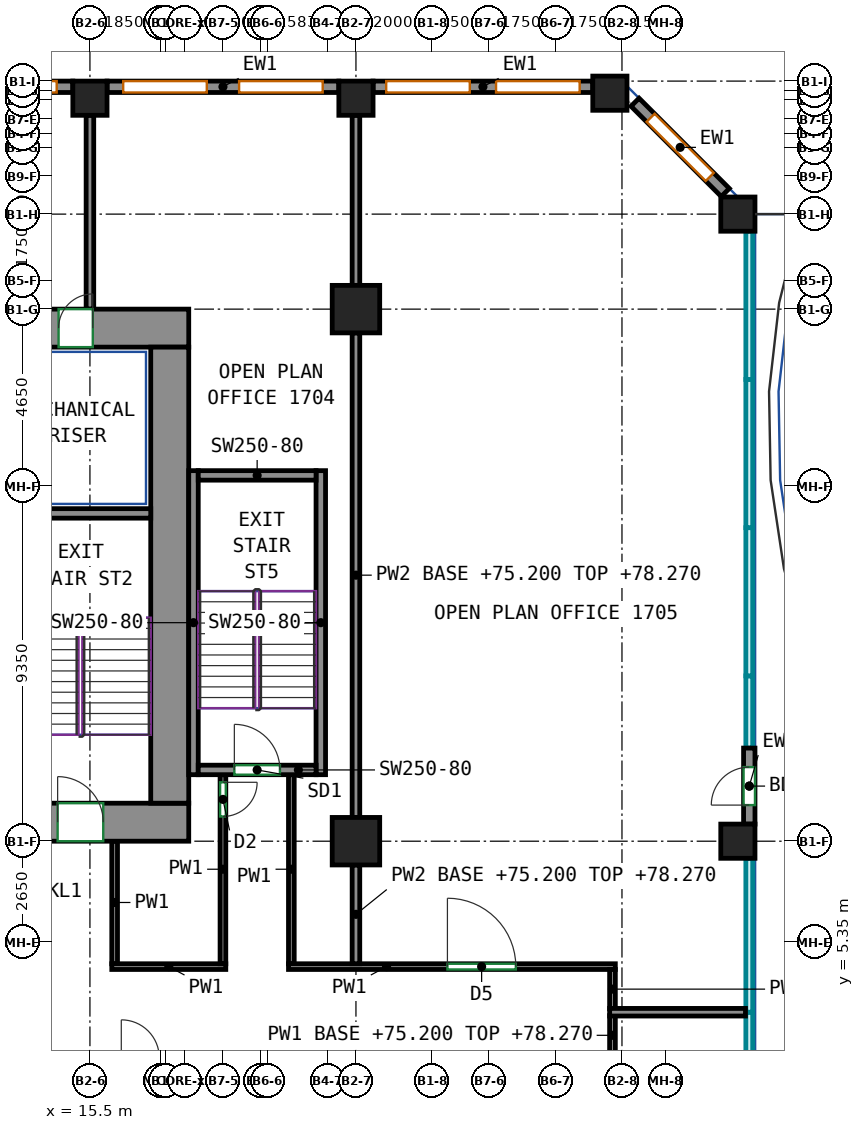
"""IFC4 building model, lengths in metres.
Left out: names, types, materials, properties, quantities, classifications, styles, units other than length and angle.
Written with IfcOpenShell. Run it as: python <this file> out.ifc"""

import sys

from ifc_helpers import new_model, si_unit, direction, frame, frame_2d, origin, origin_2d, place, context, subcontext, project, spatial, rectangle, extrude, source, transform, mapped, element, fill, save


model = new_model("IFC4")
c1 = context("Model", 3, precision=1e-05, world=origin(), true_north=direction((0.0, 1.0)))
c2 = subcontext(c1, "Body", "Model", "MODEL_VIEW")
j1 = project(units=[si_unit("LENGTHUNIT", "METRE"), si_unit("PLANEANGLEUNIT", "RADIAN")], contexts=[c1])
p1 = place(None, origin())
s1 = spatial("IfcSite", under=j1, at=p1, CompositionType="ELEMENT")
p2 = place(p1, origin())
s2 = spatial("IfcBuilding", under=s1, at=p2, CompositionType="ELEMENT")
p3 = place(p2, frame((0.0, 0.0, 75.2)))
s3 = spatial("IfcBuildingStorey", under=s2, at=p3, CompositionType="ELEMENT", Elevation=75.2)
m1 = source(origin(), c2, "Body", "SweptSolid", [
    extrude(rectangle(XDim=0.9, YDim=0.9, at=origin_2d()), origin(), (0.0, 0.0, 1.0), 3.72),
])
p4 = place(p3, frame((15.5, 27.55, 0.0), z_axis=(0.0, 0.0, 1.0), x_axis=(1.0, 0.0, 0.0)))
e1 = element("IfcColumn", 1, at=p4, inside=s3, PredefinedType="COLUMN", context=c2, shape_type="MappedRepresentation", body=[
    mapped(m1, transform((0.0, 0.0, 0.0))),
])
m2 = source(origin(), c2, "Body", "SweptSolid", [
    extrude(rectangle(XDim=1.25, YDim=1.25, at=origin_2d()), origin(), (0.0, 0.0, 1.0), 3.72),
])
for number, where, z_axis, x_axis in (
    (2, (22.5, 8.0, 0.0), (0.0, 0.0, 1.0), (1.0, 0.0, 0.0)),
    (3, (22.5, 22.0, 0.0), (0.0, 0.0, 1.0), (1.0, 0.0, 0.0)),
):
    element("IfcColumn", number, at=place(p3, frame(where, z_axis=z_axis, x_axis=x_axis)), inside=s3, PredefinedType="COLUMN", context=c2, shape_type="MappedRepresentation", body=[
        mapped(m2, transform((0.0, 0.0, 0.0))),
    ])
for number, where, z_axis, x_axis in (
    (4, (22.5, 27.55, 0.0), (0.0, 0.0, 1.0), (1.0, 0.0, 0.0)),
    (5, (29.182, 27.682, 0.0), (0.0, 0.0, 1.0), (1.0, 0.0, 0.0)),
    (6, (32.55, 8.0, 0.0), (0.0, 0.0, 1.0), (1.0, 0.0, 0.0)),
    (7, (32.55, 24.5, 0.0), (0.0, 0.0, 1.0), (1.0, 0.0, 0.0)),
):
    element("IfcColumn", number, at=place(p3, frame(where, z_axis=z_axis, x_axis=x_axis)), inside=s3, PredefinedType="COLUMN", context=c2, shape_type="MappedRepresentation", body=[
        mapped(m1, transform((0.0, 0.0, 0.0))),
    ])
m3 = source(origin(), c2, "Body", "SweptSolid", [
    extrude(rectangle(XDim=5.63, YDim=1.0, at=frame_2d((2.815, 0.0))), origin(), (0.0, 0.0, 1.0), 3.72),
])
p5 = place(p3, frame((12.47, 8.5, 0.0), z_axis=(0.0, 0.0, 1.0), x_axis=(1.0, 0.0, 0.0)))
e8 = element("IfcWall", 8, at=p5, inside=s3, PredefinedType="SHEAR", context=c2, shape_type="MappedRepresentation", body=[
    mapped(m3, transform((0.0, 0.0, 0.0))),
])
p6 = place(p5, frame((2.18, 0.0, 0.0)))
e9 = element("IfcOpeningElement", 9, at=p6, cuts=e8, PredefinedType="OPENING", context=c2, shape_type="SweptSolid", body=[
    extrude(rectangle(XDim=1.2, YDim=2.1, at=frame_2d((0.6, 1.05))), frame((0.0, 0.51, 0.0), z_axis=(0.0, -1.0, 0.0), x_axis=(1.0, 0.0, 0.0)), (0.0, 0.0, 1.0), 1.02),
])
m4 = source(origin(), c2, "Body", "SweptSolid", [
    extrude(rectangle(XDim=34.1, YDim=1.0, at=frame_2d((17.05, 0.0))), origin(), (0.0, 0.0, 1.0), 3.72),
])
p7 = place(p3, frame((-16.0, 21.5, 0.0), z_axis=(0.0, 0.0, 1.0), x_axis=(1.0, 0.0, 0.0)))
e10 = element("IfcWall", 10, at=p7, inside=s3, PredefinedType="SHEAR", context=c2, shape_type="MappedRepresentation", body=[
    mapped(m4, transform((0.0, 0.0, 0.0))),
])
p8 = place(p7, frame((6.108, 0.0, 0.0)))
e11 = element("IfcOpeningElement", 11, at=p8, cuts=e10, PredefinedType="OPENING", context=c2, shape_type="SweptSolid", body=[
    extrude(rectangle(XDim=0.9, YDim=2.1, at=frame_2d((0.45, 1.05))), frame((0.0, 0.51, 0.0), z_axis=(0.0, -1.0, 0.0), x_axis=(1.0, 0.0, 0.0)), (0.0, 0.0, 1.0), 1.02),
])
p9 = place(p7, frame((11.173, 0.0, 0.0)))
e12 = element("IfcOpeningElement", 12, at=p9, cuts=e10, PredefinedType="OPENING", context=c2, shape_type="SweptSolid", body=[
    extrude(rectangle(XDim=0.9, YDim=2.1, at=frame_2d((0.45, 1.05))), frame((0.0, 0.51, 0.0), z_axis=(0.0, -1.0, 0.0), x_axis=(1.0, 0.0, 0.0)), (0.0, 0.0, 1.0), 1.02),
])
p10 = place(p7, frame((16.238, 0.0, 0.0)))
e13 = element("IfcOpeningElement", 13, at=p10, cuts=e10, PredefinedType="OPENING", context=c2, shape_type="SweptSolid", body=[
    extrude(rectangle(XDim=0.9, YDim=2.1, at=frame_2d((0.45, 1.05))), frame((0.0, 0.51, 0.0), z_axis=(0.0, -1.0, 0.0), x_axis=(1.0, 0.0, 0.0)), (0.0, 0.0, 1.0), 1.02),
])
p11 = place(p7, frame((21.062, 0.0, 0.0)))
e14 = element("IfcOpeningElement", 14, at=p11, cuts=e10, PredefinedType="OPENING", context=c2, shape_type="SweptSolid", body=[
    extrude(rectangle(XDim=0.9, YDim=2.1, at=frame_2d((0.45, 1.05))), frame((0.0, 0.51, 0.0), z_axis=(0.0, -1.0, 0.0), x_axis=(1.0, 0.0, 0.0)), (0.0, 0.0, 1.0), 1.02),
])
p12 = place(p7, frame((26.489, 0.0, 0.0)))
e15 = element("IfcOpeningElement", 15, at=p12, cuts=e10, PredefinedType="OPENING", context=c2, shape_type="SweptSolid", body=[
    extrude(rectangle(XDim=0.9, YDim=2.1, at=frame_2d((0.45, 1.05))), frame((0.0, 0.51, 0.0), z_axis=(0.0, -1.0, 0.0), x_axis=(1.0, 0.0, 0.0)), (0.0, 0.0, 1.0), 1.02),
])
p13 = place(p7, frame((2.525, 0.0, 0.0)))
e16 = element("IfcOpeningElement", 16, at=p13, cuts=e10, PredefinedType="OPENING", context=c2, shape_type="SweptSolid", body=[
    extrude(rectangle(XDim=0.9, YDim=2.1, at=frame_2d((0.45, 1.05))), frame((0.0, 0.51, 0.0), z_axis=(0.0, -1.0, 0.0), x_axis=(1.0, 0.0, 0.0)), (0.0, 0.0, 1.0), 1.02),
])
p14 = place(p7, frame((30.675, 0.0, 0.0)))
e17 = element("IfcOpeningElement", 17, at=p14, cuts=e10, PredefinedType="OPENING", context=c2, shape_type="SweptSolid", body=[
    extrude(rectangle(XDim=0.9, YDim=2.1, at=frame_2d((0.45, 1.05))), frame((0.0, 0.51, 0.0), z_axis=(0.0, -1.0, 0.0), x_axis=(1.0, 0.0, 0.0)), (0.0, 0.0, 1.0), 1.02),
])
m5 = source(origin(), c2, "Body", "SweptSolid", [
    extrude(rectangle(XDim=12.0, YDim=1.0, at=frame_2d((6.0, 0.0))), origin(), (0.0, 0.0, 1.0), 3.72),
])
p15 = place(p3, frame((17.6, 9.0, 0.0), z_axis=(0.0, 0.0, 1.0), x_axis=(0.0, 1.0, 0.0)))
e18 = element("IfcWall", 18, at=p15, inside=s3, PredefinedType="SHEAR", context=c2, shape_type="MappedRepresentation", body=[
    mapped(m5, transform((0.0, 0.0, 0.0))),
])
m6 = source(origin(), c2, "Body", "SweptSolid", [
    extrude(rectangle(XDim=3.7, YDim=0.25, at=frame_2d((1.85, 0.0))), origin(), (0.0, 0.0, 1.0), 3.72),
])
p16 = place(p3, frame((13.4, 16.625, 0.0), z_axis=(0.0, 0.0, 1.0), x_axis=(1.0, 0.0, 0.0)))
e19 = element("IfcWall", 19, at=p16, inside=s3, PredefinedType="SHEAR", context=c2, shape_type="MappedRepresentation", body=[
    mapped(m6, transform((0.0, 0.0, 0.0))),
])
m7 = source(origin(), c2, "Body", "SweptSolid", [
    extrude(rectangle(XDim=8.0, YDim=0.25, at=frame_2d((4.0, 0.0))), origin(), (0.0, 0.0, 1.0), 3.72),
])
for number, where, z_axis, x_axis in (
    (20, (18.225, 9.75, 0.0), (0.0, 0.0, 1.0), (0.0, 1.0, 0.0)),
    (21, (21.575, 9.75, 0.0), (0.0, 0.0, 1.0), (0.0, 1.0, 0.0)),
):
    element("IfcWall", number, at=place(p3, frame(where, z_axis=z_axis, x_axis=x_axis)), inside=s3, PredefinedType="SHEAR", context=c2, shape_type="MappedRepresentation", body=[
        mapped(m7, transform((0.0, 0.0, 0.0))),
    ])
m8 = source(origin(), c2, "Body", "SweptSolid", [
    extrude(rectangle(XDim=3.1, YDim=0.25, at=frame_2d((1.55, 0.0))), origin(), (0.0, 0.0, 1.0), 3.72),
])
p17 = place(p3, frame((18.35, 9.875, 0.0), z_axis=(0.0, 0.0, 1.0), x_axis=(1.0, 0.0, 0.0)))
e22 = element("IfcWall", 22, at=p17, inside=s3, PredefinedType="SHEAR", context=c2, shape_type="MappedRepresentation", body=[
    mapped(m8, transform((0.0, 0.0, 0.0))),
])
p18 = place(p17, frame((0.95, 0.0, 0.0)))
e23 = element("IfcOpeningElement", 23, at=p18, cuts=e22, PredefinedType="OPENING", context=c2, shape_type="SweptSolid", body=[
    extrude(rectangle(XDim=1.2, YDim=2.1, at=frame_2d((0.6, 1.05))), frame((0.0, 0.135, 0.0), z_axis=(0.0, -1.0, 0.0), x_axis=(1.0, 0.0, 0.0)), (0.0, 0.0, 1.0), 0.27),
])
p19 = place(p3, frame((18.35, 17.625, 0.0), z_axis=(0.0, 0.0, 1.0), x_axis=(1.0, 0.0, 0.0)))
e24 = element("IfcWall", 24, at=p19, inside=s3, PredefinedType="SHEAR", context=c2, shape_type="MappedRepresentation", body=[
    mapped(m8, transform((0.0, 0.0, 0.0))),
])
m9 = source(origin(), c2, "Body", "SweptSolid", [
    extrude(rectangle(XDim=2.0, YDim=0.3, at=frame_2d((1.0, 0.0))), origin(), (0.0, 0.0, 1.0), 3.72),
])
p20 = place(p3, frame((32.85, 8.45, 0.0), z_axis=(0.0, 0.0, 1.0), x_axis=(0.0, 1.0, 0.0)))
e25 = element("IfcWall", 25, at=p20, inside=s3, PredefinedType="SOLIDWALL", context=c2, shape_type="MappedRepresentation", body=[
    mapped(m9, transform((0.0, 0.0, 0.0))),
])
p21 = place(p20, frame((0.5, 0.0, 0.0)))
e26 = element("IfcOpeningElement", 26, at=p21, cuts=e25, PredefinedType="OPENING", context=c2, shape_type="SweptSolid", body=[
    extrude(rectangle(XDim=1.0, YDim=2.1, at=frame_2d((0.5, 1.05))), frame((0.0, 0.16, 0.0), z_axis=(0.0, -1.0, 0.0), x_axis=(1.0, 0.0, 0.0)), (0.0, 0.0, 1.0), 0.32),
])
m10 = source(origin(), c2, "Body", "SweptSolid", [
    extrude(rectangle(XDim=3.359, YDim=0.3, at=frame_2d((1.679, 0.0))), origin(), (0.0, 0.0, 1.0), 3.72),
])
p22 = place(p3, frame((32.219, 25.069, 0.0), z_axis=(0.0, 0.0, 1.0), x_axis=(-0.707070438228, 0.707143122278, 0.0)))
e27 = element("IfcWall", 27, at=p22, inside=s3, PredefinedType="SOLIDWALL", context=c2, shape_type="MappedRepresentation", body=[
    mapped(m10, transform((0.0, 0.0, 0.0))),
])
p23 = place(p22, frame((0.579, 0.0, 0.7)))
e28 = element("IfcOpeningElement", 28, at=p23, cuts=e27, PredefinedType="OPENING", context=c2, shape_type="SweptSolid", body=[
    extrude(rectangle(XDim=2.2, YDim=2.25, at=frame_2d((1.1, 1.125))), frame((0.0, 0.16, 0.0), z_axis=(0.0, -1.0, 0.0), x_axis=(1.0, 0.0, 0.0)), (0.0, 0.0, 1.0), 0.32),
])
m11 = source(origin(), c2, "Body", "SweptSolid", [
    extrude(rectangle(XDim=5.782, YDim=0.3, at=frame_2d((2.891, 0.0))), origin(), (0.0, 0.0, 1.0), 3.72),
])
p24 = place(p3, frame((28.732, 27.85, 0.0), z_axis=(0.0, 0.0, 1.0), x_axis=(-1.0, 0.0, 0.0)))
e29 = element("IfcWall", 29, at=p24, inside=s3, PredefinedType="SOLIDWALL", context=c2, shape_type="MappedRepresentation", body=[
    mapped(m11, transform((0.0, 0.0, 0.0))),
])
p25 = place(p24, frame((0.345, 0.0, 0.7)))
e30 = element("IfcOpeningElement", 30, at=p25, cuts=e29, PredefinedType="OPENING", context=c2, shape_type="SweptSolid", body=[
    extrude(rectangle(XDim=2.2, YDim=2.25, at=frame_2d((1.1, 1.125))), frame((0.0, 0.16, 0.0), z_axis=(0.0, -1.0, 0.0), x_axis=(1.0, 0.0, 0.0)), (0.0, 0.0, 1.0), 0.32),
])
p26 = place(p24, frame((3.236, 0.0, 0.7)))
e31 = element("IfcOpeningElement", 31, at=p26, cuts=e29, PredefinedType="OPENING", context=c2, shape_type="SweptSolid", body=[
    extrude(rectangle(XDim=2.2, YDim=2.25, at=frame_2d((1.1, 1.125))), frame((0.0, 0.16, 0.0), z_axis=(0.0, -1.0, 0.0), x_axis=(1.0, 0.0, 0.0)), (0.0, 0.0, 1.0), 0.32),
])
m12 = source(origin(), c2, "Body", "SweptSolid", [
    extrude(rectangle(XDim=6.1, YDim=0.3, at=frame_2d((3.05, 0.0))), origin(), (0.0, 0.0, 1.0), 3.72),
])
p27 = place(p3, frame((22.05, 27.85, 0.0), z_axis=(0.0, 0.0, 1.0), x_axis=(-1.0, 0.0, 0.0)))
e32 = element("IfcWall", 32, at=p27, inside=s3, PredefinedType="SOLIDWALL", context=c2, shape_type="MappedRepresentation", body=[
    mapped(m12, transform((0.0, 0.0, 0.0))),
])
p28 = place(p27, frame((0.425, 0.0, 0.7)))
e33 = element("IfcOpeningElement", 33, at=p28, cuts=e32, PredefinedType="OPENING", context=c2, shape_type="SweptSolid", body=[
    extrude(rectangle(XDim=2.2, YDim=2.25, at=frame_2d((1.1, 1.125))), frame((0.0, 0.16, 0.0), z_axis=(0.0, -1.0, 0.0), x_axis=(1.0, 0.0, 0.0)), (0.0, 0.0, 1.0), 0.32),
])
p29 = place(p27, frame((3.475, 0.0, 0.7)))
e34 = element("IfcOpeningElement", 34, at=p29, cuts=e32, PredefinedType="OPENING", context=c2, shape_type="SweptSolid", body=[
    extrude(rectangle(XDim=2.2, YDim=2.25, at=frame_2d((1.1, 1.125))), frame((0.0, 0.16, 0.0), z_axis=(0.0, -1.0, 0.0), x_axis=(1.0, 0.0, 0.0)), (0.0, 0.0, 1.0), 0.32),
])
p30 = place(p3, frame((15.05, 27.85, 0.0), z_axis=(0.0, 0.0, 1.0), x_axis=(-1.0, 0.0, 0.0)))
e35 = element("IfcWall", 35, at=p30, inside=s3, PredefinedType="SOLIDWALL", context=c2, shape_type="MappedRepresentation", body=[
    mapped(m12, transform((0.0, 0.0, 0.0))),
])
p31 = place(p30, frame((0.425, 0.0, 0.7)))
e36 = element("IfcOpeningElement", 36, at=p31, cuts=e35, PredefinedType="OPENING", context=c2, shape_type="SweptSolid", body=[
    extrude(rectangle(XDim=2.2, YDim=2.25, at=frame_2d((1.1, 1.125))), frame((0.0, 0.16, 0.0), z_axis=(0.0, -1.0, 0.0), x_axis=(1.0, 0.0, 0.0)), (0.0, 0.0, 1.0), 0.32),
])
p32 = place(p30, frame((3.475, 0.0, 0.7)))
e37 = element("IfcOpeningElement", 37, at=p32, cuts=e35, PredefinedType="OPENING", context=c2, shape_type="SweptSolid", body=[
    extrude(rectangle(XDim=2.2, YDim=2.25, at=frame_2d((1.1, 1.125))), frame((0.0, 0.16, 0.0), z_axis=(0.0, -1.0, 0.0), x_axis=(1.0, 0.0, 0.0)), (0.0, 0.0, 1.0), 0.32),
])
p33 = place(p3, frame((16.15, 4.775, 0.0), z_axis=(0.0, 0.0, 1.0), x_axis=(0.0, 1.0, 0.0)))
e38 = element("IfcWall", 38, at=p33, inside=s3, PredefinedType="PARTITIONING", context=c2, shape_type="SweptSolid", body=[
    extrude(rectangle(XDim=3.225, YDim=0.15, at=frame_2d((1.613, 0.0))), origin(), (0.0, 0.0, 1.0), 3.72),
])
p34 = place(p3, frame((16.075, 4.7, 0.0), z_axis=(0.0, 0.0, 1.0), x_axis=(1.0, 0.0, 0.0)))
e39 = element("IfcWall", 39, at=p34, inside=s3, PredefinedType="PARTITIONING", context=c2, shape_type="SweptSolid", body=[
    extrude(rectangle(XDim=3.0, YDim=0.15, at=frame_2d((1.5, 0.0))), origin(), (0.0, 0.0, 1.0), 3.72),
])
p35 = place(p3, frame((19.0, 9.75, 0.0), z_axis=(0.0, 0.0, 1.0), x_axis=(0.0, -1.0, 0.0)))
e40 = element("IfcWall", 40, at=p35, inside=s3, PredefinedType="PARTITIONING", context=c2, shape_type="SweptSolid", body=[
    extrude(rectangle(XDim=4.975, YDim=0.15, at=frame_2d((2.488, 0.0))), origin(), (0.0, 0.0, 1.0), 3.72),
])
p36 = place(p35, frame((0.2, 0.0, 0.0)))
e41 = element("IfcOpeningElement", 41, at=p36, cuts=e40, PredefinedType="OPENING", context=c2, shape_type="SweptSolid", body=[
    extrude(rectangle(XDim=0.9, YDim=2.1, at=frame_2d((0.45, 1.05))), frame((0.0, 0.085, 0.0), z_axis=(0.0, -1.0, 0.0), x_axis=(1.0, 0.0, 0.0)), (0.0, 0.0, 1.0), 0.17),
])
p37 = place(p3, frame((20.8, 4.775, 0.0), z_axis=(0.0, 0.0, 1.0), x_axis=(0.0, 1.0, 0.0)))
e42 = element("IfcWall", 42, at=p37, inside=s3, PredefinedType="PARTITIONING", context=c2, shape_type="SweptSolid", body=[
    extrude(rectangle(XDim=4.975, YDim=0.15, at=frame_2d((2.488, 0.0))), origin(), (0.0, 0.0, 1.0), 3.72),
])
p38 = place(p3, frame((20.725, 4.7, 0.0), z_axis=(0.0, 0.0, 1.0), x_axis=(1.0, 0.0, 0.0)))
e43 = element("IfcWall", 43, at=p38, inside=s3, PredefinedType="PARTITIONING", context=c2, shape_type="SweptSolid", body=[
    extrude(rectangle(XDim=8.6, YDim=0.15, at=frame_2d((4.3, 0.0))), origin(), (0.0, 0.0, 1.0), 3.72),
])
p39 = place(p38, frame((4.182, 0.0, 0.0)))
e44 = element("IfcOpeningElement", 44, at=p39, cuts=e43, PredefinedType="OPENING", context=c2, shape_type="SweptSolid", body=[
    extrude(rectangle(XDim=1.8, YDim=2.1, at=frame_2d((0.9, 1.05))), frame((0.0, 0.085, 0.0), z_axis=(0.0, -1.0, 0.0), x_axis=(1.0, 0.0, 0.0)), (0.0, 0.0, 1.0), 0.17),
])
for number, where, z_axis, x_axis in (
    (45, (29.25, 3.59, 0.0), (0.0, 0.0, 1.0), (0.0, 1.0, 0.0)),
    (46, (29.25, 2.375, 0.0), (0.0, 0.0, 1.0), (0.0, 1.0, 0.0)),
):
    element("IfcWall", number, at=place(p3, frame(where, z_axis=z_axis, x_axis=x_axis)), inside=s3, PredefinedType="PARTITIONING", context=c2, shape_type="SweptSolid", body=[
        extrude(rectangle(XDim=1.035, YDim=0.15, at=frame_2d((0.518, 0.0))), origin(), (0.0, 0.0, 1.0), 3.07),
    ])
p40 = place(p3, frame((15.5, 22.0, 0.0), z_axis=(0.0, 0.0, 1.0), x_axis=(0.0, 1.0, 0.0)))
e47 = element("IfcWall", 47, at=p40, inside=s3, PredefinedType="PARTITIONING", context=c2, shape_type="SweptSolid", body=[
    extrude(rectangle(XDim=5.1, YDim=0.2, at=frame_2d((2.55, 0.0))), origin(), (0.0, 0.0, 1.0), 3.72),
])
p41 = place(p3, frame((22.5, 22.625, 0.0), z_axis=(0.0, 0.0, 1.0), x_axis=(0.0, 1.0, 0.0)))
e48 = element("IfcWall", 48, at=p41, inside=s3, PredefinedType="PARTITIONING", context=c2, shape_type="SweptSolid", body=[
    extrude(rectangle(XDim=4.475, YDim=0.2, at=frame_2d((2.238, 0.0))), origin(), (0.0, 0.0, 1.0), 3.72),
])
p42 = place(p3, frame((22.5, 8.625, 0.0), z_axis=(0.0, 0.0, 1.0), x_axis=(0.0, 1.0, 0.0)))
e49 = element("IfcWall", 49, at=p42, inside=s3, PredefinedType="PARTITIONING", context=c2, shape_type="SweptSolid", body=[
    extrude(rectangle(XDim=12.75, YDim=0.2, at=frame_2d((6.375, 0.0))), origin(), (0.0, 0.0, 1.0), 3.07),
])
p43 = place(p3, frame((22.5, 4.776, 0.0), z_axis=(0.0, 0.0, 1.0), x_axis=(0.0, 1.0, 0.0)))
e50 = element("IfcWall", 50, at=p43, inside=s3, PredefinedType="PARTITIONING", context=c2, shape_type="SweptSolid", body=[
    extrude(rectangle(XDim=2.599, YDim=0.2, at=frame_2d((1.3, 0.0))), origin(), (0.0, 0.0, 1.0), 3.07),
])
p44 = place(p3, frame((29.176, 3.5, 0.0), z_axis=(0.0, 0.0, 1.0), x_axis=(1.0, 0.0, 0.0)))
e51 = element("IfcWall", 51, at=p44, inside=s3, PredefinedType="PARTITIONING", context=c2, shape_type="SweptSolid", body=[
    extrude(rectangle(XDim=3.574, YDim=0.2, at=frame_2d((1.787, 0.0))), origin(), (0.0, 0.0, 1.0), 3.72),
])
p45 = place(p21, origin())
e52 = element("IfcDoor", 52, at=p45, inside=s3, OperationType="SINGLE_SWING_LEFT", PredefinedType="DOOR", context=c2, shape_type="SweptSolid", body=[
    extrude(rectangle(XDim=1.0, YDim=2.1, at=frame_2d((0.5, 1.05))), frame((0.0, 0.025, 0.0), z_axis=(0.0, -1.0, 0.0), x_axis=(1.0, 0.0, 0.0)), (0.0, 0.0, 1.0), 0.05),
])
fill(e26, e52)
p46 = place(p23, origin())
e53 = element("IfcWindow", 53, at=p46, inside=s3, PartitioningType="SINGLE_PANEL", PredefinedType="WINDOW", context=c2, shape_type="SweptSolid", body=[
    extrude(rectangle(XDim=2.2, YDim=2.25, at=frame_2d((1.1, 1.125))), frame((0.0, 0.03, 0.0), z_axis=(0.0, -1.0, 0.0), x_axis=(1.0, 0.0, 0.0)), (0.0, 0.0, 1.0), 0.06),
])
fill(e28, e53)
p47 = place(p25, origin())
e54 = element("IfcWindow", 54, at=p47, inside=s3, PartitioningType="SINGLE_PANEL", PredefinedType="WINDOW", context=c2, shape_type="SweptSolid", body=[
    extrude(rectangle(XDim=2.2, YDim=2.25, at=frame_2d((1.1, 1.125))), frame((0.0, 0.03, 0.0), z_axis=(0.0, -1.0, 0.0), x_axis=(1.0, 0.0, 0.0)), (0.0, 0.0, 1.0), 0.06),
])
fill(e30, e54)
p48 = place(p26, origin())
e55 = element("IfcWindow", 55, at=p48, inside=s3, PartitioningType="SINGLE_PANEL", PredefinedType="WINDOW", context=c2, shape_type="SweptSolid", body=[
    extrude(rectangle(XDim=2.2, YDim=2.25, at=frame_2d((1.1, 1.125))), frame((0.0, 0.03, 0.0), z_axis=(0.0, -1.0, 0.0), x_axis=(1.0, 0.0, 0.0)), (0.0, 0.0, 1.0), 0.06),
])
fill(e31, e55)
p49 = place(p28, origin())
e56 = element("IfcWindow", 56, at=p49, inside=s3, PartitioningType="SINGLE_PANEL", PredefinedType="WINDOW", context=c2, shape_type="SweptSolid", body=[
    extrude(rectangle(XDim=2.2, YDim=2.25, at=frame_2d((1.1, 1.125))), frame((0.0, 0.03, 0.0), z_axis=(0.0, -1.0, 0.0), x_axis=(1.0, 0.0, 0.0)), (0.0, 0.0, 1.0), 0.06),
])
fill(e33, e56)
p50 = place(p29, origin())
e57 = element("IfcWindow", 57, at=p50, inside=s3, PartitioningType="SINGLE_PANEL", PredefinedType="WINDOW", context=c2, shape_type="SweptSolid", body=[
    extrude(rectangle(XDim=2.2, YDim=2.25, at=frame_2d((1.1, 1.125))), frame((0.0, 0.03, 0.0), z_axis=(0.0, -1.0, 0.0), x_axis=(1.0, 0.0, 0.0)), (0.0, 0.0, 1.0), 0.06),
])
fill(e34, e57)
p51 = place(p31, origin())
e58 = element("IfcWindow", 58, at=p51, inside=s3, PartitioningType="SINGLE_PANEL", PredefinedType="WINDOW", context=c2, shape_type="SweptSolid", body=[
    extrude(rectangle(XDim=2.2, YDim=2.25, at=frame_2d((1.1, 1.125))), frame((0.0, 0.03, 0.0), z_axis=(0.0, -1.0, 0.0), x_axis=(1.0, 0.0, 0.0)), (0.0, 0.0, 1.0), 0.06),
])
fill(e36, e58)
p52 = place(p14, origin())
e59 = element("IfcDoor", 59, at=p52, inside=s3, OperationType="SINGLE_SWING_RIGHT", PredefinedType="DOOR", context=c2, shape_type="SweptSolid", body=[
    extrude(rectangle(XDim=0.9, YDim=2.1, at=frame_2d((0.45, 1.05))), frame((0.0, -0.355, 0.0), z_axis=(0.0, -1.0, 0.0), x_axis=(1.0, 0.0, 0.0)), (0.0, 0.0, 1.0), 0.05),
])
fill(e17, e59)
p53 = place(p6, origin())
e60 = element("IfcDoor", 60, at=p53, inside=s3, OperationType="DOUBLE_DOOR_SINGLE_SWING", PredefinedType="DOOR", context=c2, shape_type="SweptSolid", body=[
    extrude(rectangle(XDim=1.2, YDim=2.1, at=frame_2d((0.6, 1.05))), frame((0.0, 0.405, 0.0), z_axis=(0.0, -1.0, 0.0), x_axis=(1.0, 0.0, 0.0)), (0.0, 0.0, 1.0), 0.05),
])
fill(e9, e60)
p54 = place(p18, origin())
e61 = element("IfcDoor", 61, at=p54, inside=s3, OperationType="DOUBLE_DOOR_SINGLE_SWING", PredefinedType="DOOR", context=c2, shape_type="SweptSolid", body=[
    extrude(rectangle(XDim=1.2, YDim=2.1, at=frame_2d((0.6, 1.05))), frame((0.0, 0.025, 0.0), z_axis=(0.0, -1.0, 0.0), x_axis=(1.0, 0.0, 0.0)), (0.0, 0.0, 1.0), 0.05),
])
fill(e23, e61)
p55 = place(p39, origin())
e62 = element("IfcDoor", 62, at=p55, inside=s3, OperationType="DOUBLE_DOOR_SINGLE_SWING", PredefinedType="DOOR", context=c2, shape_type="SweptSolid", body=[
    extrude(rectangle(XDim=1.8, YDim=2.1, at=frame_2d((0.9, 1.05))), frame((0.0, 0.025, 0.0), z_axis=(0.0, -1.0, 0.0), x_axis=(1.0, 0.0, 0.0)), (0.0, 0.0, 1.0), 0.05),
])
fill(e44, e62)
p56 = place(p36, origin())
e63 = element("IfcDoor", 63, at=p56, inside=s3, OperationType="SINGLE_SWING_LEFT", PredefinedType="DOOR", context=c2, shape_type="SweptSolid", body=[
    extrude(rectangle(XDim=0.9, YDim=2.1, at=frame_2d((0.45, 1.05))), frame((0.0, 0.025, 0.0), z_axis=(0.0, -1.0, 0.0), x_axis=(1.0, 0.0, 0.0)), (0.0, 0.0, 1.0), 0.05),
])
fill(e41, e63)
save(model, sys.argv[1])
